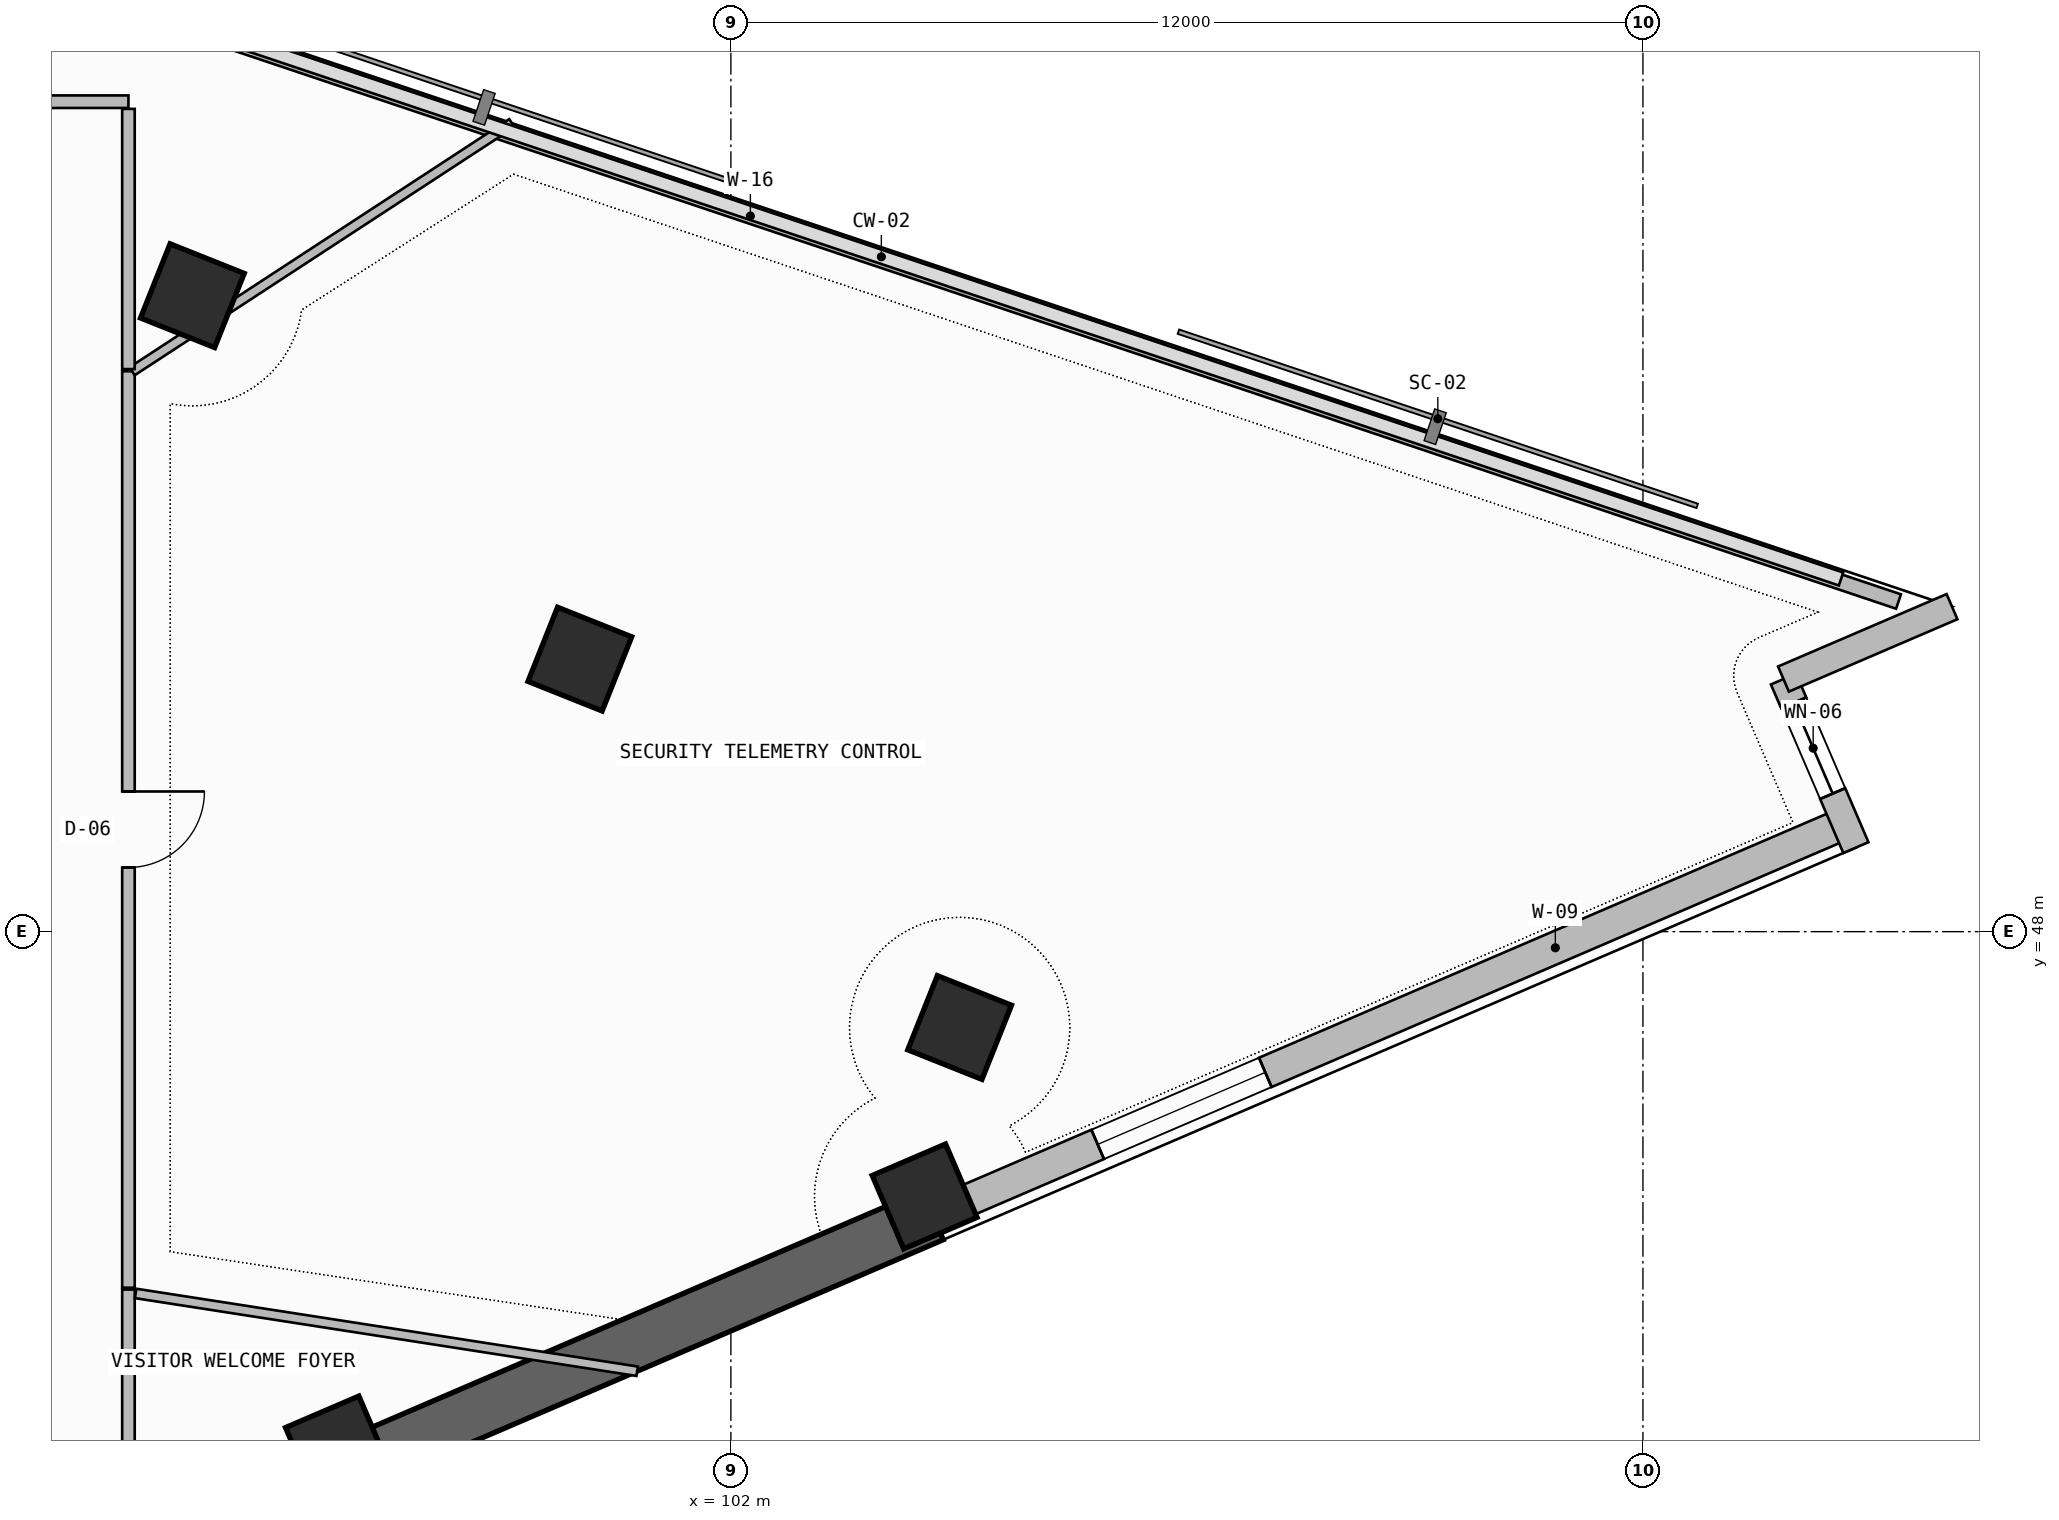
"""IFC4 building model, lengths in metres.
Left out: names, types, materials, properties, quantities, classifications, styles, units other than length and angle.
Written with IfcOpenShell. Run it as: python <this file> out.ifc"""

import sys

from ifc_helpers import new_model, si_unit, direction, frame, frame_2d, origin, origin_2d, place, context, subcontext, project, spatial, rectangle, extrude, element, fill, save


model = new_model("IFC4")
c1 = context("Model", 3, precision=1e-05, world=origin(), true_north=direction((0.0, 1.0)))
c2 = subcontext(c1, "Body", "Model", "MODEL_VIEW")
j1 = project(units=[si_unit("LENGTHUNIT", "METRE"), si_unit("PLANEANGLEUNIT", "RADIAN")], contexts=[c1])
p1 = place(None, origin())
s1 = spatial("IfcSite", under=j1, at=p1, CompositionType="ELEMENT")
p2 = place(p1, origin())
s2 = spatial("IfcBuilding", under=s1, at=p2, CompositionType="ELEMENT")
p3 = place(p2, frame((0.0, 0.0, 164.7)))
s3 = spatial("IfcBuildingStorey", under=s2, at=p3, CompositionType="ELEMENT", Elevation=164.7)
for number, where, z_axis, x_axis in (
    (1, (96.83, 41.2, -0.4), (0.0, 0.0, 1.0), (0.919, 0.395, 0.0)),
    (2, (104.549, 44.517, -0.4), (0.0, 0.0, 1.0), (0.919, 0.395, 0.0)),
    (3, (105.01, 46.739, -0.4), (0.0, 0.0, 1.0), (0.371, 0.929, 0.0)),
    (4, (100.013, 51.585, -0.4), (0.0, 0.0, 1.0), (0.371, 0.929, 0.0)),
    (5, (94.915, 56.367, -0.4), (0.0, 0.0, 1.0), (0.371, 0.929, 0.0)),
):
    element("IfcColumn", number, at=place(p3, frame(where, z_axis=z_axis, x_axis=x_axis)), inside=s3, PredefinedType="COLUMN", context=c2, shape_type="SweptSolid", body=[
        extrude(rectangle(XDim=1.05, YDim=1.05, at=origin_2d()), origin(), (0.0, 0.0, 1.0), 4.0),
    ])
p4 = place(p3, frame((96.937, 40.952, -0.4), z_axis=(0.0, 0.0, 1.0), x_axis=(0.918782407933, 0.394764343468, 0.0)))
e6 = element("IfcWall", 6, at=p4, inside=s3, PredefinedType="SHEAR", context=c2, shape_type="SweptSolid", body=[
    extrude(rectangle(XDim=8.402, YDim=0.7, at=frame_2d((4.201, 0.0))), origin(), (0.0, 0.0, 1.0), 3.74),
])
p5 = place(p3, frame((104.656, 44.269, 0.0), z_axis=(0.0, 0.0, 1.0), x_axis=(0.918789071809, 0.394748833467, 0.0)))
e7 = element("IfcWall", 7, at=p5, inside=s3, PredefinedType="SOLIDWALL", context=c2, shape_type="SweptSolid", body=[
    extrude(rectangle(XDim=13.069, YDim=0.42, at=frame_2d((6.534, 0.0))), origin(), (0.0, 0.0, 1.0), 2.725),
])
p6 = place(p5, frame((2.362, 0.0, 1.2)))
e8 = element("IfcOpeningElement", 8, at=p6, cuts=e7, PredefinedType="OPENING", context=c2, shape_type="SweptSolid", body=[
    extrude(rectangle(XDim=2.4, YDim=0.9, at=frame_2d((1.2, 0.45))), frame((0.0, 0.22, 0.0), z_axis=(0.0, -1.0, 0.0), x_axis=(1.0, 0.0, 0.0)), (0.0, 0.0, 1.0), 0.44),
])
p7 = place(p3, frame((116.802, 49.106, 0.0), z_axis=(0.0, 0.0, 1.0), x_axis=(-0.394712707157, 0.918804592288, 0.0)))
e9 = element("IfcWall", 9, at=p7, inside=s3, PredefinedType="SOLIDWALL", context=c2, shape_type="SweptSolid", body=[
    extrude(rectangle(XDim=2.414, YDim=0.36, at=frame_2d((1.207, 0.0))), origin(), (0.0, 0.0, 1.0), 3.34),
])
p8 = place(p7, frame((0.773, 0.0, 0.45)))
e10 = element("IfcOpeningElement", 10, at=p8, cuts=e9, PredefinedType="OPENING", context=c2, shape_type="SweptSolid", body=[
    extrude(rectangle(XDim=1.3, YDim=2.4, at=frame_2d((0.65, 1.2))), frame((0.0, 0.19, 0.0), z_axis=(0.0, -1.0, 0.0), x_axis=(1.0, 0.0, 0.0)), (0.0, 0.0, 1.0), 0.38),
])
p9 = place(p3, frame((115.849, 51.323, 0.0), z_axis=(0.0, 0.0, 1.0), x_axis=(0.918788830096, 0.394749396062, 0.0)))
e11 = element("IfcWall", 11, at=p9, inside=s3, PredefinedType="SOLIDWALL", context=c2, shape_type="SweptSolid", body=[
    extrude(rectangle(XDim=2.413, YDim=0.36, at=frame_2d((1.207, 0.0))), origin(), (0.0, 0.0, 1.0), 3.34),
])
p10 = place(p3, frame((117.363, 52.344, 0.0), z_axis=(0.0, 0.0, 1.0), x_axis=(-0.94800468727, 0.31825636351, 0.0)))
e12 = element("IfcWall", 12, at=p10, inside=s3, PredefinedType="PARAPET", context=c2, shape_type="SweptSolid", body=[
    extrude(rectangle(XDim=31.869, YDim=0.2, at=frame_2d((15.935, 0.0))), origin(), (0.0, 0.0, 1.0), 1.15),
])
p11 = place(p3, frame((94.074, 41.137, 0.0), z_axis=(0.0, 0.0, 1.0), x_axis=(0.0, 1.0, 0.0)))
e13 = element("IfcWall", 13, at=p11, inside=s3, PredefinedType="PARTITIONING", context=c2, shape_type="SweptSolid", body=[
    extrude(rectangle(XDim=2.155, YDim=0.165, at=frame_2d((1.077, 0.0))), origin(), (0.0, 0.0, 1.0), 2.825),
])
p12 = place(p3, frame((94.168, 43.24, 0.0), z_axis=(0.0, 0.0, 1.0), x_axis=(0.988173043675, -0.153342869914, 0.0)))
e14 = element("IfcWall", 14, at=p12, inside=s3, PredefinedType="PARTITIONING", context=c2, shape_type="SweptSolid", body=[
    extrude(rectangle(XDim=6.677, YDim=0.125, at=frame_2d((3.339, 0.0))), origin(), (0.0, 0.0, 1.0), 2.725),
])
p13 = place(p3, frame((94.074, 43.316, 0.0), z_axis=(0.0, 0.0, 1.0), x_axis=(0.0, 1.0, 0.0)))
e15 = element("IfcWall", 15, at=p13, inside=s3, PredefinedType="PARTITIONING", context=c2, shape_type="SweptSolid", body=[
    extrude(rectangle(XDim=12.057, YDim=0.165, at=frame_2d((6.028, 0.0))), origin(), (0.0, 0.0, 1.0), 2.825),
])
p14 = place(p13, frame((5.528, 0.0, 0.0)))
e16 = element("IfcOpeningElement", 16, at=p14, cuts=e15, PredefinedType="OPENING", context=c2, shape_type="SweptSolid", body=[
    extrude(rectangle(XDim=1.0, YDim=2.2, at=frame_2d((0.5, 1.1))), frame((0.0, 0.093, 0.0), z_axis=(0.0, -1.0, 0.0), x_axis=(1.0, 0.0, 0.0)), (0.0, 0.0, 1.0), 0.185),
])
p15 = place(p3, frame((94.122, 55.373, 0.0), z_axis=(0.0, 0.0, 1.0), x_axis=(0.837125239486, 0.547011273573, 0.0)))
e17 = element("IfcWall", 17, at=p15, inside=s3, PredefinedType="PARTITIONING", context=c2, shape_type="SweptSolid", body=[
    extrude(rectangle(XDim=5.968, YDim=0.125, at=frame_2d((2.984, 0.0))), origin(), (0.0, 0.0, 1.0), 2.725),
])
p16 = place(p3, frame((94.074, 58.919, 0.0), z_axis=(0.0, 0.0, 1.0), x_axis=(-1.0, 0.0, 0.0)))
e18 = element("IfcWall", 18, at=p16, inside=s3, PredefinedType="PARTITIONING", context=c2, shape_type="SweptSolid", body=[
    extrude(rectangle(XDim=15.041, YDim=0.165, at=frame_2d((7.521, 0.0))), origin(), (0.0, 0.0, 1.0), 2.725),
])
p17 = place(p16, frame((1.837, 0.0, 0.0)))
e19 = element("IfcOpeningElement", 19, at=p17, cuts=e18, PredefinedType="OPENING", context=c2, shape_type="SweptSolid", body=[
    extrude(rectangle(XDim=1.0, YDim=2.2, at=frame_2d((0.5, 1.1))), frame((0.0, 0.093, 0.0), z_axis=(0.0, -1.0, 0.0), x_axis=(1.0, 0.0, 0.0)), (0.0, 0.0, 1.0), 0.185),
])
p18 = place(p3, frame((94.074, 55.401, 0.0), z_axis=(0.0, 0.0, 1.0), x_axis=(0.0, 1.0, 0.0)))
e20 = element("IfcWall", 20, at=p18, inside=s3, PredefinedType="PARTITIONING", context=c2, shape_type="SweptSolid", body=[
    extrude(rectangle(XDim=3.424, YDim=0.165, at=frame_2d((1.712, 0.0))), origin(), (0.0, 0.0, 1.0), 2.725),
])
p19 = place(p6, origin())
e21 = element("IfcWindow", 21, at=p19, inside=s3, PartitioningType="SINGLE_PANEL", PredefinedType="WINDOW", context=c2, shape_type="SweptSolid", body=[
    extrude(rectangle(XDim=2.4, YDim=0.9, at=frame_2d((1.2, 0.45))), frame((0.0, 0.03, 0.0), z_axis=(0.0, -1.0, 0.0), x_axis=(1.0, 0.0, 0.0)), (0.0, 0.0, 1.0), 0.06),
])
fill(e8, e21)
p20 = place(p8, origin())
e22 = element("IfcWindow", 22, at=p20, inside=s3, PartitioningType="SINGLE_PANEL", PredefinedType="WINDOW", context=c2, shape_type="SweptSolid", body=[
    extrude(rectangle(XDim=1.3, YDim=2.4, at=frame_2d((0.65, 1.2))), frame((0.0, 0.03, 0.0), z_axis=(0.0, -1.0, 0.0), x_axis=(1.0, 0.0, 0.0)), (0.0, 0.0, 1.0), 0.06),
])
fill(e10, e22)
p21 = place(p14, frame((1.0, 0.0, 0.0), z_axis=(0.0, 0.0, 1.0), x_axis=(-1.0, 0.0, 0.0)))
e23 = element("IfcDoor", 23, at=p21, inside=s3, OperationType="SINGLE_SWING_LEFT", PredefinedType="DOOR", context=c2, shape_type="SweptSolid", body=[
    extrude(rectangle(XDim=1.0, YDim=2.2, at=frame_2d((0.5, 1.1))), frame((0.0, 0.025, 0.0), z_axis=(0.0, -1.0, 0.0), x_axis=(1.0, 0.0, 0.0)), (0.0, 0.0, 1.0), 0.05),
])
fill(e16, e23)
save(model, sys.argv[1])
